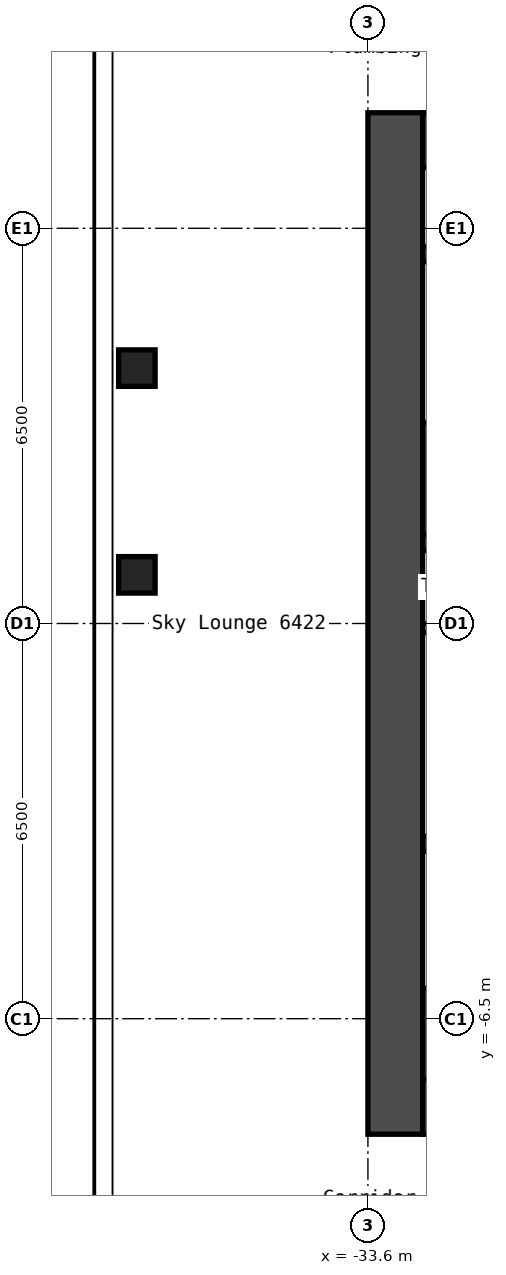
"""IFC4 building model, lengths in metres.
Left out: names, types, materials, properties, quantities, classifications, styles, units other than length and angle.
Written with IfcOpenShell. Run it as: python <this file> out.ifc"""

import sys

from ifc_helpers import new_model, si_unit, direction, frame, frame_2d, origin, origin_2d, place, context, subcontext, project, spatial, rectangle, hollow_rectangle, extrude, element, save


model = new_model("IFC4")
c1 = context("Model", 3, precision=1e-05, world=origin(), true_north=direction((0.0, 1.0)))
c2 = subcontext(c1, "Body", "Model", "MODEL_VIEW")
j1 = project(units=[si_unit("LENGTHUNIT", "METRE"), si_unit("PLANEANGLEUNIT", "RADIAN")], contexts=[c1])
p1 = place(None, origin())
s1 = spatial("IfcSite", under=j1, at=p1, CompositionType="ELEMENT")
p2 = place(p1, origin())
s2 = spatial("IfcBuilding", under=s1, at=p2, CompositionType="ELEMENT")
p3 = place(p2, frame((0.0, 0.0, 225.0)))
s3 = spatial("IfcBuildingStorey", under=s2, at=p3, CompositionType="ELEMENT", Elevation=225.0)
for number, where, z_axis, x_axis in (
    (1, (-37.4, 0.8, 0.0), (0.0, 0.0, 1.0), (1.0, 0.0, 0.0)),
    (2, (-37.4, 4.2, 0.0), (0.0, 0.0, 1.0), (1.0, 0.0, 0.0)),
):
    element("IfcColumn", number, at=place(p3, frame(where, z_axis=z_axis, x_axis=x_axis)), inside=s3, PredefinedType="COLUMN", context=c2, shape_type="SweptSolid", body=[
        extrude(hollow_rectangle(XDim=0.6, YDim=0.6, WallThickness=0.025, InnerFilletRadius=0.038, OuterFilletRadius=0.062, at=origin_2d()), origin(), (0.0, 0.0, 1.0), 2.9),
    ])
p4 = place(p3, frame((-33.15, -8.4, 0.0), z_axis=(0.0, 0.0, 1.0), x_axis=(0.0, 1.0, 0.0)))
e3 = element("IfcWall", 3, at=p4, inside=s3, PredefinedType="SHEAR", context=c2, shape_type="SweptSolid", body=[
    extrude(rectangle(XDim=16.8, YDim=0.9, at=frame_2d((8.4, 0.0))), origin(), (0.0, 0.0, 1.0), 2.9),
])
p5 = place(p3, frame((-32.7, 7.95, 0.0), z_axis=(0.0, 0.0, 1.0), x_axis=(1.0, 0.0, 0.0)))
e4 = element("IfcWall", 4, at=p5, inside=s3, PredefinedType="SHEAR", context=c2, shape_type="SweptSolid", body=[
    extrude(rectangle(XDim=15.0, YDim=0.9, at=frame_2d((7.5, 0.0))), origin(), (0.0, 0.0, 1.0), 2.9),
])
p6 = place(p5, frame((3.4, 0.0, 0.0)))
e5 = element("IfcOpeningElement", 5, at=p6, cuts=e4, PredefinedType="OPENING", context=c2, shape_type="SweptSolid", body=[
    extrude(rectangle(XDim=1.2, YDim=2.1, at=frame_2d((0.6, 1.05))), frame((0.0, 0.46, 0.0), z_axis=(0.0, -1.0, 0.0), x_axis=(1.0, 0.0, 0.0)), (0.0, 0.0, 1.0), 0.92),
])
p7 = place(p5, frame((0.75, 0.0, 0.0)))
e6 = element("IfcOpeningElement", 6, at=p7, cuts=e4, PredefinedType="OPENING", context=c2, shape_type="SweptSolid", body=[
    extrude(rectangle(XDim=0.9, YDim=2.1, at=frame_2d((0.45, 1.05))), frame((0.0, 0.46, 0.0), z_axis=(0.0, -1.0, 0.0), x_axis=(1.0, 0.0, 0.0)), (0.0, 0.0, 1.0), 0.92),
])
p8 = place(p3, frame((-32.7, -7.95, 0.0), z_axis=(0.0, 0.0, 1.0), x_axis=(1.0, 0.0, 0.0)))
e7 = element("IfcWall", 7, at=p8, inside=s3, PredefinedType="SHEAR", context=c2, shape_type="SweptSolid", body=[
    extrude(rectangle(XDim=15.0, YDim=0.9, at=frame_2d((7.5, 0.0))), origin(), (0.0, 0.0, 1.0), 2.9),
])
p9 = place(p8, frame((11.45, 0.0, 0.0)))
e8 = element("IfcOpeningElement", 8, at=p9, cuts=e7, PredefinedType="OPENING", context=c2, shape_type="SweptSolid", body=[
    extrude(rectangle(XDim=1.0, YDim=2.1, at=frame_2d((0.5, 1.05))), frame((0.0, 0.46, 0.0), z_axis=(0.0, -1.0, 0.0), x_axis=(1.0, 0.0, 0.0)), (0.0, 0.0, 1.0), 0.92),
])
p10 = place(p3, frame((-32.7, 1.325, 0.0), z_axis=(0.0, 0.0, 1.0), x_axis=(1.0, 0.0, 0.0)))
e9 = element("IfcWall", 9, at=p10, inside=s3, PredefinedType="SHEAR", context=c2, shape_type="SweptSolid", body=[
    extrude(rectangle(XDim=5.05, YDim=0.25, at=frame_2d((2.525, 0.0))), origin(), (0.0, 0.0, 1.0), 2.9),
])
p11 = place(p10, frame((3.3, 0.0, 0.0)))
e10 = element("IfcOpeningElement", 10, at=p11, cuts=e9, PredefinedType="OPENING", context=c2, shape_type="SweptSolid", body=[
    extrude(rectangle(XDim=1.2, YDim=2.1, at=frame_2d((0.6, 1.05))), frame((0.0, 0.135, 0.0), z_axis=(0.0, -1.0, 0.0), x_axis=(1.0, 0.0, 0.0)), (0.0, 0.0, 1.0), 0.27),
])
p12 = place(p3, frame((-32.7, 2.375, 0.0), z_axis=(0.0, 0.0, 1.0), x_axis=(1.0, 0.0, 0.0)))
e11 = element("IfcWall", 11, at=p12, inside=s3, PredefinedType="SHEAR", context=c2, shape_type="SweptSolid", body=[
    extrude(rectangle(XDim=2.4, YDim=1.85, at=frame_2d((1.2, 0.0))), origin(), (0.0, 0.0, 1.0), 2.9),
])
p13 = place(p3, frame((-32.7, 6.075, 0.0), z_axis=(0.0, 0.0, 1.0), x_axis=(1.0, 0.0, 0.0)))
e12 = element("IfcWall", 12, at=p13, inside=s3, PredefinedType="SHEAR", context=c2, shape_type="SweptSolid", body=[
    extrude(rectangle(XDim=2.4, YDim=0.25, at=frame_2d((1.2, 0.0))), origin(), (0.0, 0.0, 1.0), 2.9),
])
p14 = place(p3, frame((-32.7, -3.625, 0.0), z_axis=(0.0, 0.0, 1.0), x_axis=(1.0, 0.0, 0.0)))
e13 = element("IfcWall", 13, at=p14, inside=s3, PredefinedType="SHEAR", context=c2, shape_type="SweptSolid", body=[
    extrude(rectangle(XDim=4.55, YDim=0.25, at=frame_2d((2.275, 0.0))), origin(), (0.0, 0.0, 1.0), 2.9),
])
p15 = place(p14, frame((2.85, 0.0, 0.0)))
e14 = element("IfcOpeningElement", 14, at=p15, cuts=e13, PredefinedType="OPENING", context=c2, shape_type="SweptSolid", body=[
    extrude(rectangle(XDim=1.1, YDim=2.1, at=frame_2d((0.55, 1.05))), frame((0.0, 0.135, 0.0), z_axis=(0.0, -1.0, 0.0), x_axis=(1.0, 0.0, 0.0)), (0.0, 0.0, 1.0), 0.27),
])
p16 = place(p14, frame((0.6, 0.0, 0.0)))
e15 = element("IfcOpeningElement", 15, at=p16, cuts=e13, PredefinedType="OPENING", context=c2, shape_type="SweptSolid", body=[
    extrude(rectangle(XDim=1.1, YDim=2.1, at=frame_2d((0.55, 1.05))), frame((0.0, 0.135, 0.0), z_axis=(0.0, -1.0, 0.0), x_axis=(1.0, 0.0, 0.0)), (0.0, 0.0, 1.0), 0.27),
])
p17 = place(p3, frame((-32.7, -6.75, 0.0), z_axis=(0.0, 0.0, 1.0), x_axis=(1.0, 0.0, 0.0)))
e16 = element("IfcWall", 16, at=p17, inside=s3, PredefinedType="SHEAR", context=c2, shape_type="SweptSolid", body=[
    extrude(rectangle(XDim=4.55, YDim=1.5, at=frame_2d((2.275, 0.0))), origin(), (0.0, 0.0, 1.0), 2.9),
])
p18 = place(p3, frame((-32.7, -0.075, 0.0), z_axis=(0.0, 0.0, 1.0), x_axis=(1.0, 0.0, 0.0)))
e17 = element("IfcWall", 17, at=p18, inside=s3, PredefinedType="PARTITIONING", context=c2, shape_type="SweptSolid", body=[
    extrude(rectangle(XDim=3.0, YDim=0.15, at=frame_2d((1.5, 0.0))), origin(), (0.0, 0.0, 1.0), 2.9),
])
save(model, sys.argv[1])
